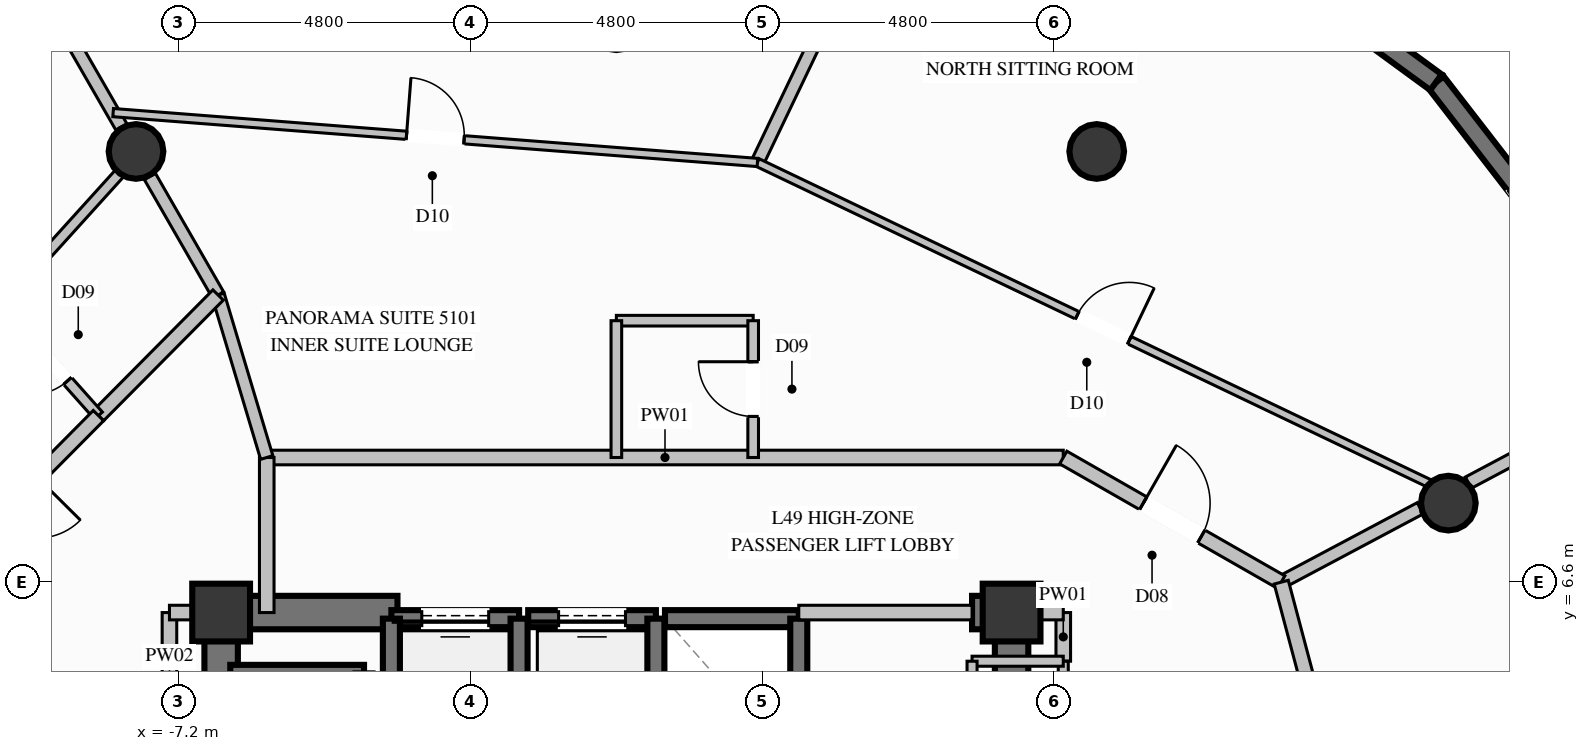
"""IFC4 building model, lengths in metres.
Left out: names, types, materials, properties, quantities, classifications, styles, units other than length and angle.
Written with IfcOpenShell. Run it as: python <this file> out.ifc"""

import sys

from ifc_helpers import new_model, si_unit, direction, frame, frame_2d, origin, origin_2d, place, context, subcontext, project, spatial, rectangle, circle, extrude, element, fill, save


model = new_model("IFC4")
c1 = context("Model", 3, precision=1e-05, world=origin(), true_north=direction((0.0, 1.0)))
c2 = subcontext(c1, "Body", "Model", "MODEL_VIEW")
j1 = project(units=[si_unit("LENGTHUNIT", "METRE"), si_unit("PLANEANGLEUNIT", "RADIAN")], contexts=[c1])
p1 = place(None, origin())
s1 = spatial("IfcSite", under=j1, at=p1, CompositionType="ELEMENT")
p2 = place(p1, origin())
s2 = spatial("IfcBuilding", under=s1, at=p2, CompositionType="ELEMENT")
p3 = place(p2, frame((0.0, 0.0, 191.2)))
s3 = spatial("IfcBuildingStorey", under=s2, at=p3, CompositionType="ELEMENT", Elevation=191.2)
for number, where, z_axis, x_axis in (
    (1, (6.5, 6.1, 0.0), (0.0, 0.0, 1.0), (1.0, 0.0, 0.0)),
    (2, (-6.5, 6.1, 0.0), (0.0, 0.0, 1.0), (1.0, 0.0, 0.0)),
):
    element("IfcColumn", number, at=place(p3, frame(where, z_axis=z_axis, x_axis=x_axis)), inside=s3, PredefinedType="COLUMN", context=c2, shape_type="SweptSolid", body=[
        extrude(rectangle(XDim=0.95, YDim=0.95, at=origin_2d()), origin(), (0.0, 0.0, 1.0), 3.6),
    ])
p4 = place(p3, frame((-6.225, 6.1, 0.0), z_axis=(0.0, 0.0, 1.0), x_axis=(1.0, 0.0, 0.0)))
e3 = element("IfcWall", 3, at=p4, inside=s3, PredefinedType="SHEAR", context=c2, shape_type="SweptSolid", body=[
    extrude(rectangle(XDim=2.625, YDim=0.55, at=frame_2d((1.312, 0.0))), origin(), (0.0, 0.0, 1.0), 3.6),
])
p5 = place(p3, frame((5.85, 6.1, 0.0), z_axis=(0.0, 0.0, 1.0), x_axis=(1.0, 0.0, 0.0)))
e4 = element("IfcWall", 4, at=p5, inside=s3, PredefinedType="SHEAR", context=c2, shape_type="SweptSolid", body=[
    extrude(rectangle(XDim=0.375, YDim=0.55, at=frame_2d((0.188, 0.0))), origin(), (0.0, 0.0, 1.0), 3.6),
])
p6 = place(p3, frame((-6.5, 2.35, 0.0), z_axis=(0.0, 0.0, 1.0), x_axis=(0.0, 1.0, 0.0)))
e5 = element("IfcWall", 5, at=p6, inside=s3, PredefinedType="SHEAR", context=c2, shape_type="SweptSolid", body=[
    extrude(rectangle(XDim=4.025, YDim=0.55, at=frame_2d((2.012, 0.0))), origin(), (0.0, 0.0, 1.0), 3.6),
])
p7 = place(p3, frame((6.5, 3.35, 0.0), z_axis=(0.0, 0.0, 1.0), x_axis=(0.0, 1.0, 0.0)))
e6 = element("IfcWall", 6, at=p7, inside=s3, PredefinedType="SHEAR", context=c2, shape_type="SweptSolid", body=[
    extrude(rectangle(XDim=3.025, YDim=0.55, at=frame_2d((1.512, 0.0))), origin(), (0.0, 0.0, 1.0), 3.6),
])
for number, where, z_axis, x_axis in (
    (7, (13.683, 7.9, 0.0), (0.0, 0.0, 1.0), (1.0, 0.0, 0.0)),
    (8, (7.9, 13.683, 0.0), (0.0, 0.0, 1.0), (1.0, 0.0, 0.0)),
    (9, (-7.9, 13.683, 0.0), (0.0, 0.0, 1.0), (1.0, 0.0, 0.0)),
):
    element("IfcColumn", number, at=place(p3, frame(where, z_axis=z_axis, x_axis=x_axis)), inside=s3, PredefinedType="COLUMN", context=c2, shape_type="SweptSolid", body=[
        extrude(circle(Radius=0.45, at=origin_2d()), origin(), (0.0, 0.0, 1.0), 3.6),
    ])
p8 = place(p3, frame((13.48, 14.821, 0.0), z_axis=(0.0, 0.0, 1.0), x_axis=(0.611810985794, -0.791003993455, 0.0)))
e10 = element("IfcWall", 10, at=p8, inside=s3, PredefinedType="SOLIDWALL", context=c2, shape_type="SweptSolid", body=[
    extrude(rectangle(XDim=6.785, YDim=0.32, at=frame_2d((3.393, 0.0))), origin(), (0.0, 0.0, 1.0), 3.36),
])
p9 = place(p8, frame((2.123, 0.0, 0.35)))
e11 = element("IfcOpeningElement", 11, at=p9, cuts=e10, PredefinedType="OPENING", context=c2, shape_type="SweptSolid", body=[
    extrude(rectangle(XDim=1.8, YDim=2.6, at=frame_2d((0.9, 1.3))), frame((0.0, 0.17, 0.0), z_axis=(0.0, -1.0, 0.0), x_axis=(1.0, 0.0, 0.0)), (0.0, 0.0, 1.0), 0.34),
])
p10 = place(p3, frame((8.122, 18.738, 0.0), z_axis=(0.0, 0.0, 1.0), x_axis=(0.80727653181, -0.590173365368, 0.0)))
e12 = element("IfcWall", 12, at=p10, inside=s3, PredefinedType="SOLIDWALL", context=c2, shape_type="SweptSolid", body=[
    extrude(rectangle(XDim=6.637, YDim=0.32, at=frame_2d((3.318, 0.0))), origin(), (0.0, 0.0, 1.0), 3.36),
])
p11 = place(p10, frame((2.419, 0.0, 0.35)))
e13 = element("IfcOpeningElement", 13, at=p11, cuts=e12, PredefinedType="OPENING", context=c2, shape_type="SweptSolid", body=[
    extrude(rectangle(XDim=1.8, YDim=2.6, at=frame_2d((0.9, 1.3))), frame((0.0, 0.17, 0.0), z_axis=(0.0, -1.0, 0.0), x_axis=(1.0, 0.0, 0.0)), (0.0, 0.0, 1.0), 0.34),
])
p12 = place(p3, frame((-1.6, 6.0, 0.0), z_axis=(0.0, 0.0, 1.0), x_axis=(-1.0, 0.0, 0.0)))
e14 = element("IfcWall", 14, at=p12, inside=s3, PredefinedType="SOLIDWALL", context=c2, shape_type="SweptSolid", body=[
    extrude(rectangle(XDim=2.1, YDim=0.28, at=frame_2d((1.05, 0.0))), origin(), (0.0, 0.0, 1.0), 3.36),
])
p13 = place(p12, frame((0.5, 0.0, 0.0)))
e15 = element("IfcOpeningElement", 15, at=p13, cuts=e14, PredefinedType="OPENING", context=c2, shape_type="SweptSolid", body=[
    extrude(rectangle(XDim=1.1, YDim=2.2, at=frame_2d((0.55, 1.1))), frame((0.0, 0.15, 0.0), z_axis=(0.0, -1.0, 0.0), x_axis=(1.0, 0.0, 0.0)), (0.0, 0.0, 1.0), 0.3),
])
for number, where, z_axis, x_axis in (
    (16, (-3.7, 6.0, 0.0), (0.0, 0.0, 1.0), (0.0, -1.0, 0.0)),
    (17, (-1.6, 3.5, 0.0), (0.0, 0.0, 1.0), (0.0, 1.0, 0.0)),
):
    element("IfcWall", number, at=place(p3, frame(where, z_axis=z_axis, x_axis=x_axis)), inside=s3, PredefinedType="SOLIDWALL", context=c2, shape_type="SweptSolid", body=[
        extrude(rectangle(XDim=2.5, YDim=0.28, at=frame_2d((1.25, 0.0))), origin(), (0.0, 0.0, 1.0), 3.36),
    ])
p14 = place(p3, frame((0.65, 6.0, 0.0), z_axis=(0.0, 0.0, 1.0), x_axis=(-1.0, 0.0, 0.0)))
e18 = element("IfcWall", 18, at=p14, inside=s3, PredefinedType="SOLIDWALL", context=c2, shape_type="SweptSolid", body=[
    extrude(rectangle(XDim=2.1, YDim=0.28, at=frame_2d((1.05, 0.0))), origin(), (0.0, 0.0, 1.0), 3.36),
])
p15 = place(p14, frame((0.5, 0.0, 0.0)))
e19 = element("IfcOpeningElement", 19, at=p15, cuts=e18, PredefinedType="OPENING", context=c2, shape_type="SweptSolid", body=[
    extrude(rectangle(XDim=1.1, YDim=2.2, at=frame_2d((0.55, 1.1))), frame((0.0, 0.15, 0.0), z_axis=(0.0, -1.0, 0.0), x_axis=(1.0, 0.0, 0.0)), (0.0, 0.0, 1.0), 0.3),
])
p16 = place(p3, frame((0.65, 3.5, 0.0), z_axis=(0.0, 0.0, 1.0), x_axis=(0.0, 1.0, 0.0)))
e20 = element("IfcWall", 20, at=p16, inside=s3, PredefinedType="SOLIDWALL", context=c2, shape_type="SweptSolid", body=[
    extrude(rectangle(XDim=2.5, YDim=0.28, at=frame_2d((1.25, 0.0))), origin(), (0.0, 0.0, 1.0), 3.36),
])
p17 = place(p3, frame((3.0, 6.0, 0.0), z_axis=(0.0, 0.0, 1.0), x_axis=(-1.0, 0.0, 0.0)))
e21 = element("IfcWall", 21, at=p17, inside=s3, PredefinedType="SOLIDWALL", context=c2, shape_type="SweptSolid", body=[
    extrude(rectangle(XDim=2.2, YDim=0.28, at=frame_2d((1.1, 0.0))), origin(), (0.0, 0.0, 1.0), 3.36),
])
p18 = place(p3, frame((3.0, 3.5, 0.0), z_axis=(0.0, 0.0, 1.0), x_axis=(0.0, 1.0, 0.0)))
e22 = element("IfcWall", 22, at=p18, inside=s3, PredefinedType="SOLIDWALL", context=c2, shape_type="SweptSolid", body=[
    extrude(rectangle(XDim=2.5, YDim=0.28, at=frame_2d((1.25, 0.0))), origin(), (0.0, 0.0, 1.0), 3.36),
])
p19 = place(p3, frame((-4.15, 5.1, 0.0), z_axis=(0.0, 0.0, 1.0), x_axis=(-1.0, 0.0, 0.0)))
e23 = element("IfcWall", 23, at=p19, inside=s3, PredefinedType="SOLIDWALL", context=c2, shape_type="SweptSolid", body=[
    extrude(rectangle(XDim=2.2, YDim=0.28, at=frame_2d((1.1, 0.0))), origin(), (0.0, 0.0, 1.0), 3.36),
])
p20 = place(p3, frame((-5.75, 8.65, 0.0), z_axis=(0.0, 0.0, 1.0), x_axis=(1.0, 0.0, 0.0)))
e24 = element("IfcWall", 24, at=p20, inside=s3, PredefinedType="PARTITIONING", context=c2, shape_type="SweptSolid", body=[
    extrude(rectangle(XDim=13.1, YDim=0.24, at=frame_2d((6.55, 0.0))), origin(), (0.0, 0.0, 1.0), 3.36),
])
p21 = place(p3, frame((3.0, 6.1, 0.0), z_axis=(0.0, 0.0, 1.0), x_axis=(1.0, 0.0, 0.0)))
e25 = element("IfcWall", 25, at=p21, inside=s3, PredefinedType="PARTITIONING", context=c2, shape_type="SweptSolid", body=[
    extrude(rectangle(XDim=2.85, YDim=0.24, at=frame_2d((1.425, 0.0))), origin(), (0.0, 0.0, 1.0), 2.445),
])
p22 = place(p3, frame((7.35, 5.3, 0.0), z_axis=(0.0, 0.0, 1.0), x_axis=(0.0, 1.0, 0.0)))
e26 = element("IfcWall", 26, at=p22, inside=s3, PredefinedType="PARTITIONING", context=c2, shape_type="SweptSolid", body=[
    extrude(rectangle(XDim=0.8, YDim=0.24, at=frame_2d((0.4, 0.0))), origin(), (0.0, 0.0, 1.0), 2.445),
])
p23 = place(p3, frame((6.5, 6.1, 0.0), z_axis=(0.0, 0.0, 1.0), x_axis=(1.0, 0.0, 0.0)))
e27 = element("IfcWall", 27, at=p23, inside=s3, PredefinedType="PARTITIONING", context=c2, shape_type="SweptSolid", body=[
    extrude(rectangle(XDim=0.85, YDim=0.24, at=frame_2d((0.425, 0.0))), origin(), (0.0, 0.0, 1.0), 2.876),
])
p24 = place(p3, frame((-5.75, 6.1, 0.0), z_axis=(0.0, 0.0, 1.0), x_axis=(0.0, 1.0, 0.0)))
e28 = element("IfcWall", 28, at=p24, inside=s3, PredefinedType="PARTITIONING", context=c2, shape_type="SweptSolid", body=[
    extrude(rectangle(XDim=2.55, YDim=0.24, at=frame_2d((1.275, 0.0))), origin(), (0.0, 0.0, 1.0), 3.36),
])
p25 = place(p3, frame((-7.35, 4.95, 0.0), z_axis=(0.0, 0.0, 1.0), x_axis=(0.0, 1.0, 0.0)))
e29 = element("IfcWall", 29, at=p25, inside=s3, PredefinedType="PARTITIONING", context=c2, shape_type="SweptSolid", body=[
    extrude(rectangle(XDim=1.15, YDim=0.24, at=frame_2d((0.575, 0.0))), origin(), (0.0, 0.0, 1.0), 2.445),
])
p26 = place(p3, frame((-7.35, 6.1, 0.0), z_axis=(0.0, 0.0, 1.0), x_axis=(1.0, 0.0, 0.0)))
e30 = element("IfcWall", 30, at=p26, inside=s3, PredefinedType="PARTITIONING", context=c2, shape_type="SweptSolid", body=[
    extrude(rectangle(XDim=0.85, YDim=0.24, at=frame_2d((0.425, 0.0))), origin(), (0.0, 0.0, 1.0), 2.876),
])
p27 = place(p3, frame((7.35, 2.75, 0.0), z_axis=(0.0, 0.0, 1.0), x_axis=(0.0, 1.0, 0.0)))
e31 = element("IfcWall", 31, at=p27, inside=s3, PredefinedType="PARTITIONING", context=c2, shape_type="SweptSolid", body=[
    extrude(rectangle(XDim=2.55, YDim=0.165, at=frame_2d((1.275, 0.0))), origin(), (0.0, 0.0, 1.0), 3.36),
])
p28 = place(p27, frame((0.8, 0.0, 0.0)))
e32 = element("IfcOpeningElement", 32, at=p28, cuts=e31, PredefinedType="OPENING", context=c2, shape_type="SweptSolid", body=[
    extrude(rectangle(XDim=0.95, YDim=2.1, at=frame_2d((0.475, 1.05))), frame((0.0, 0.093, 0.0), z_axis=(0.0, -1.0, 0.0), x_axis=(1.0, 0.0, 0.0)), (0.0, 0.0, 1.0), 0.185),
])
p29 = place(p3, frame((7.35, 5.3, 0.0), z_axis=(0.0, 0.0, 1.0), x_axis=(-1.0, 0.0, 0.0)))
e33 = element("IfcWall", 33, at=p29, inside=s3, PredefinedType="PARTITIONING", context=c2, shape_type="SweptSolid", body=[
    extrude(rectangle(XDim=1.5, YDim=0.165, at=frame_2d((0.75, 0.0))), origin(), (0.0, 0.0, 1.0), 2.445),
])
p30 = place(p3, frame((5.85, 5.3, 0.0), z_axis=(0.0, 0.0, 1.0), x_axis=(0.0, -1.0, 0.0)))
e34 = element("IfcWall", 34, at=p30, inside=s3, PredefinedType="PARTITIONING", context=c2, shape_type="SweptSolid", body=[
    extrude(rectangle(XDim=2.55, YDim=0.165, at=frame_2d((1.275, 0.0))), origin(), (0.0, 0.0, 1.0), 2.445),
])
p31 = place(p3, frame((10.935, 6.6, 0.0), z_axis=(0.0, 0.0, 1.0), x_axis=(0.883041221412, 0.469295430711, 0.0)))
e35 = element("IfcWall", 35, at=p31, inside=s3, PredefinedType="PARTITIONING", context=c2, shape_type="SweptSolid", body=[
    extrude(rectangle(XDim=2.589, YDim=0.21, at=frame_2d((1.294, 0.0))), origin(), (0.0, 0.0, 1.0), 2.876),
])
p32 = place(p3, frame((14.012, 8.236, 0.0), z_axis=(0.0, 0.0, 1.0), x_axis=(0.883051974866, 0.469275196112, 0.0)))
e36 = element("IfcWall", 36, at=p32, inside=s3, PredefinedType="PARTITIONING", context=c2, shape_type="SweptSolid", body=[
    extrude(rectangle(XDim=3.62, YDim=0.21, at=frame_2d((1.81, 0.0))), origin(), (0.0, 0.0, 1.0), 3.36),
])
p33 = place(p3, frame((-6.55, 11.322, 0.0), z_axis=(0.0, 0.0, 1.0), x_axis=(-0.498754501597, 0.866743299447, 0.0)))
e37 = element("IfcWall", 37, at=p33, inside=s3, PredefinedType="PARTITIONING", context=c2, shape_type="SweptSolid", body=[
    extrude(rectangle(XDim=2.25, YDim=0.21, at=frame_2d((1.125, 0.0))), origin(), (0.0, 0.0, 1.0), 2.876),
])
p34 = place(p3, frame((-8.141, 14.087, 0.0), z_axis=(0.0, 0.0, 1.0), x_axis=(-0.498683982258, 0.866783874931, 0.0)))
e38 = element("IfcWall", 38, at=p34, inside=s3, PredefinedType="PARTITIONING", context=c2, shape_type="SweptSolid", body=[
    extrude(rectangle(XDim=4.676, YDim=0.21, at=frame_2d((2.338, 0.0))), origin(), (0.0, 0.0, 1.0), 3.36),
])
p35 = place(p3, frame((0.0, 10.9, 0.0), z_axis=(0.0, 0.0, 1.0), x_axis=(1.0, 0.0, 0.0)))
e39 = element("IfcWall", 39, at=p35, inside=s3, PredefinedType="PLUMBINGWALL", context=c2, shape_type="SweptSolid", body=[
    extrude(rectangle(XDim=2.25, YDim=0.175, at=frame_2d((1.125, 0.0))), origin(), (0.0, 0.0, 1.0), 3.042),
])
p36 = place(p3, frame((0.0, 10.9, 0.0), z_axis=(0.0, 0.0, 1.0), x_axis=(0.0, -1.0, 0.0)))
e40 = element("IfcWall", 40, at=p36, inside=s3, PredefinedType="PLUMBINGWALL", context=c2, shape_type="SweptSolid", body=[
    extrude(rectangle(XDim=2.25, YDim=0.175, at=frame_2d((1.125, 0.0))), origin(), (0.0, 0.0, 1.0), 3.36),
])
p37 = place(p3, frame((2.25, 8.65, 0.0), z_axis=(0.0, 0.0, 1.0), x_axis=(0.0, 1.0, 0.0)))
e41 = element("IfcWall", 41, at=p37, inside=s3, PredefinedType="PLUMBINGWALL", context=c2, shape_type="SweptSolid", body=[
    extrude(rectangle(XDim=2.25, YDim=0.175, at=frame_2d((1.125, 0.0))), origin(), (0.0, 0.0, 1.0), 3.36),
])
p38 = place(p37, frame((0.675, 0.0, 0.0)))
e42 = element("IfcOpeningElement", 42, at=p38, cuts=e41, PredefinedType="OPENING", context=c2, shape_type="SweptSolid", body=[
    extrude(rectangle(XDim=0.9, YDim=2.1, at=frame_2d((0.45, 1.05))), frame((0.0, 0.098, 0.0), z_axis=(0.0, -1.0, 0.0), x_axis=(1.0, 0.0, 0.0)), (0.0, 0.0, 1.0), 0.195),
])
p39 = place(p3, frame((-6.55, 11.322, 0.0), z_axis=(0.0, 0.0, 1.0), x_axis=(0.286825893059, -0.957982727961, 0.0)))
e43 = element("IfcWall", 43, at=p39, inside=s3, PredefinedType="PARTITIONING", context=c2, shape_type="SweptSolid", body=[
    extrude(rectangle(XDim=2.789, YDim=0.21, at=frame_2d((1.395, 0.0))), origin(), (0.0, 0.0, 1.0), 3.36),
])
p40 = place(p3, frame((7.35, 8.65, 0.0), z_axis=(0.0, 0.0, 1.0), x_axis=(0.868112139229, -0.496368123193, 0.0)))
e44 = element("IfcWall", 44, at=p40, inside=s3, PredefinedType="PARTITIONING", context=c2, shape_type="SweptSolid", body=[
    extrude(rectangle(XDim=4.13, YDim=0.24, at=frame_2d((2.065, 0.0))), origin(), (0.0, 0.0, 1.0), 3.36),
])
p41 = place(p40, frame((1.515, 0.0, 0.0)))
e45 = element("IfcOpeningElement", 45, at=p41, cuts=e44, PredefinedType="OPENING", context=c2, shape_type="SweptSolid", body=[
    extrude(rectangle(XDim=1.1, YDim=2.3, at=frame_2d((0.55, 1.15))), frame((0.0, 0.13, 0.0), z_axis=(0.0, -1.0, 0.0), x_axis=(1.0, 0.0, 0.0)), (0.0, 0.0, 1.0), 0.26),
])
p42 = place(p3, frame((2.32, 13.502, 0.0), z_axis=(0.0, 0.0, 1.0), x_axis=(0.431352014973, 0.902183705893, 0.0)))
e46 = element("IfcWall", 46, at=p42, inside=s3, PredefinedType="PARTITIONING", context=c2, shape_type="SweptSolid", body=[
    extrude(rectangle(XDim=6.846, YDim=0.21, at=frame_2d((3.423, 0.0))), origin(), (0.0, 0.0, 1.0), 3.36),
])
p43 = place(p3, frame((2.32, 13.502, 0.0), z_axis=(0.0, 0.0, 1.0), x_axis=(0.90230783313, -0.431092303656, 0.0)))
e47 = element("IfcWall", 47, at=p43, inside=s3, PredefinedType="PARTITIONING", context=c2, shape_type="SweptSolid", body=[
    extrude(rectangle(XDim=12.608, YDim=0.135, at=frame_2d((6.304, 0.0))), origin(), (0.0, 0.0, 1.0), 2.929),
])
p44 = place(p43, frame((5.829, 0.0, 0.0)))
e48 = element("IfcOpeningElement", 48, at=p44, cuts=e47, PredefinedType="OPENING", context=c2, shape_type="SweptSolid", body=[
    extrude(rectangle(XDim=0.95, YDim=2.1, at=frame_2d((0.475, 1.05))), frame((0.0, 0.078, 0.0), z_axis=(0.0, -1.0, 0.0), x_axis=(1.0, 0.0, 0.0)), (0.0, 0.0, 1.0), 0.155),
])
p45 = place(p3, frame((-8.276, 14.322, 0.0), z_axis=(0.0, 0.0, 1.0), x_axis=(0.997018431195, -0.077163772963, 0.0)))
e49 = element("IfcWall", 49, at=p45, inside=s3, PredefinedType="PARTITIONING", context=c2, shape_type="SweptSolid", body=[
    extrude(rectangle(XDim=10.628, YDim=0.135, at=frame_2d((5.314, 0.0))), origin(), (0.0, 0.0, 1.0), 3.36),
])
p46 = place(p45, frame((4.839, 0.0, 0.0)))
e50 = element("IfcOpeningElement", 50, at=p46, cuts=e49, PredefinedType="OPENING", context=c2, shape_type="SweptSolid", body=[
    extrude(rectangle(XDim=0.95, YDim=2.1, at=frame_2d((0.475, 1.05))), frame((0.0, 0.078, 0.0), z_axis=(0.0, -1.0, 0.0), x_axis=(1.0, 0.0, 0.0)), (0.0, 0.0, 1.0), 0.155),
])
p47 = place(p3, frame((-6.55, 11.322, 0.0), z_axis=(0.0, 0.0, 1.0), x_axis=(-0.704436417235, -0.709767098472, 0.0)))
e51 = element("IfcWall", 51, at=p47, inside=s3, PredefinedType="PARTITIONING", context=c2, shape_type="SweptSolid", body=[
    extrude(rectangle(XDim=2.794, YDim=0.24, at=frame_2d((1.397, 0.0))), origin(), (0.0, 0.0, 1.0), 3.36),
])
p48 = place(p3, frame((-7.884, 13.64, 0.0), z_axis=(0.0, 0.0, 1.0), x_axis=(-0.671062027172, -0.74140121101, 0.0)))
e52 = element("IfcWall", 52, at=p48, inside=s3, PredefinedType="PLUMBINGWALL", context=c2, shape_type="SweptSolid", body=[
    extrude(rectangle(XDim=3.353, YDim=0.175, at=frame_2d((1.676, 0.0))), origin(), (0.0, 0.0, 1.0), 2.929),
])
p49 = place(p3, frame((-8.518, 9.339, 0.0), z_axis=(0.0, 0.0, 1.0), x_axis=(-0.664980955203, 0.746860314395, 0.0)))
e53 = element("IfcWall", 53, at=p49, inside=s3, PredefinedType="PLUMBINGWALL", context=c2, shape_type="SweptSolid", body=[
    extrude(rectangle(XDim=2.43, YDim=0.175, at=frame_2d((1.215, 0.0))), origin(), (0.0, 0.0, 1.0), 3.36),
])
p50 = place(p49, frame((0.765, 0.0, 0.0)))
e54 = element("IfcOpeningElement", 54, at=p50, cuts=e53, PredefinedType="OPENING", context=c2, shape_type="SweptSolid", body=[
    extrude(rectangle(XDim=0.9, YDim=2.1, at=frame_2d((0.45, 1.05))), frame((0.0, 0.098, 0.0), z_axis=(0.0, -1.0, 0.0), x_axis=(1.0, 0.0, 0.0)), (0.0, 0.0, 1.0), 0.195),
])
p51 = place(p3, frame((-8.518, 9.339, 0.0), z_axis=(0.0, 0.0, 1.0), x_axis=(-0.7042534056, -0.70994868878, 0.0)))
e55 = element("IfcWall", 55, at=p51, inside=s3, PredefinedType="PARTITIONING", context=c2, shape_type="SweptSolid", body=[
    extrude(rectangle(XDim=3.858, YDim=0.24, at=frame_2d((1.929, 0.0))), origin(), (0.0, 0.0, 1.0), 3.36),
])
p52 = place(p51, frame((1.429, 0.0, 0.0)))
e56 = element("IfcOpeningElement", 56, at=p52, cuts=e55, PredefinedType="OPENING", context=c2, shape_type="SweptSolid", body=[
    extrude(rectangle(XDim=1.0, YDim=2.2, at=frame_2d((0.5, 1.1))), frame((0.0, 0.13, 0.0), z_axis=(0.0, -1.0, 0.0), x_axis=(1.0, 0.0, 0.0)), (0.0, 0.0, 1.0), 0.26),
])
p53 = place(p3, frame((12.65, 0.15, 0.0), z_axis=(0.0, 0.0, 1.0), x_axis=(-0.256934024047, 0.966428945804, 0.0)))
e57 = element("IfcWall", 57, at=p53, inside=s3, PredefinedType="PARTITIONING", context=c2, shape_type="SweptSolid", body=[
    extrude(rectangle(XDim=6.674, YDim=0.24, at=frame_2d((3.337, 0.0))), origin(), (0.0, 0.0, 1.0), 3.36),
])
p54 = place(p13, origin())
e58 = element("IfcDoor", 58, at=p54, inside=s3, OperationType="SLIDING_TO_LEFT", PredefinedType="DOOR", context=c2, shape_type="SweptSolid", body=[
    extrude(rectangle(XDim=1.1, YDim=2.2, at=frame_2d((0.55, 1.1))), frame((0.0, 0.025, 0.0), z_axis=(0.0, -1.0, 0.0), x_axis=(1.0, 0.0, 0.0)), (0.0, 0.0, 1.0), 0.05),
])
fill(e15, e58)
p55 = place(p15, origin())
e59 = element("IfcDoor", 59, at=p55, inside=s3, OperationType="SLIDING_TO_LEFT", PredefinedType="DOOR", context=c2, shape_type="SweptSolid", body=[
    extrude(rectangle(XDim=1.1, YDim=2.2, at=frame_2d((0.55, 1.1))), frame((0.0, 0.025, 0.0), z_axis=(0.0, -1.0, 0.0), x_axis=(1.0, 0.0, 0.0)), (0.0, 0.0, 1.0), 0.05),
])
fill(e19, e59)
p56 = place(p38, origin())
e60 = element("IfcDoor", 60, at=p56, inside=s3, OperationType="SINGLE_SWING_RIGHT", PredefinedType="DOOR", context=c2, shape_type="SweptSolid", body=[
    extrude(rectangle(XDim=0.9, YDim=2.1, at=frame_2d((0.45, 1.05))), frame((0.0, 0.025, 0.0), z_axis=(0.0, -1.0, 0.0), x_axis=(1.0, 0.0, 0.0)), (0.0, 0.0, 1.0), 0.05),
])
fill(e42, e60)
p57 = place(p41, origin())
e61 = element("IfcDoor", 61, at=p57, inside=s3, OperationType="SINGLE_SWING_LEFT", PredefinedType="DOOR", context=c2, shape_type="SweptSolid", body=[
    extrude(rectangle(XDim=1.1, YDim=2.3, at=frame_2d((0.55, 1.15))), frame((0.0, 0.025, 0.0), z_axis=(0.0, -1.0, 0.0), x_axis=(1.0, 0.0, 0.0)), (0.0, 0.0, 1.0), 0.05),
])
fill(e45, e61)
p58 = place(p44, origin())
e62 = element("IfcDoor", 62, at=p58, inside=s3, OperationType="SINGLE_SWING_RIGHT", PredefinedType="DOOR", context=c2, shape_type="SweptSolid", body=[
    extrude(rectangle(XDim=0.95, YDim=2.1, at=frame_2d((0.475, 1.05))), frame((0.0, 0.025, 0.0), z_axis=(0.0, -1.0, 0.0), x_axis=(1.0, 0.0, 0.0)), (0.0, 0.0, 1.0), 0.05),
])
fill(e48, e62)
p59 = place(p46, origin())
e63 = element("IfcDoor", 63, at=p59, inside=s3, OperationType="SINGLE_SWING_LEFT", PredefinedType="DOOR", context=c2, shape_type="SweptSolid", body=[
    extrude(rectangle(XDim=0.95, YDim=2.1, at=frame_2d((0.475, 1.05))), frame((0.0, 0.025, 0.0), z_axis=(0.0, -1.0, 0.0), x_axis=(1.0, 0.0, 0.0)), (0.0, 0.0, 1.0), 0.05),
])
fill(e50, e63)
p60 = place(p50, origin())
e64 = element("IfcDoor", 64, at=p60, inside=s3, OperationType="SINGLE_SWING_RIGHT", PredefinedType="DOOR", context=c2, shape_type="SweptSolid", body=[
    extrude(rectangle(XDim=0.9, YDim=2.1, at=frame_2d((0.45, 1.05))), frame((0.0, 0.025, 0.0), z_axis=(0.0, -1.0, 0.0), x_axis=(1.0, 0.0, 0.0)), (0.0, 0.0, 1.0), 0.05),
])
fill(e54, e64)
save(model, sys.argv[1])
